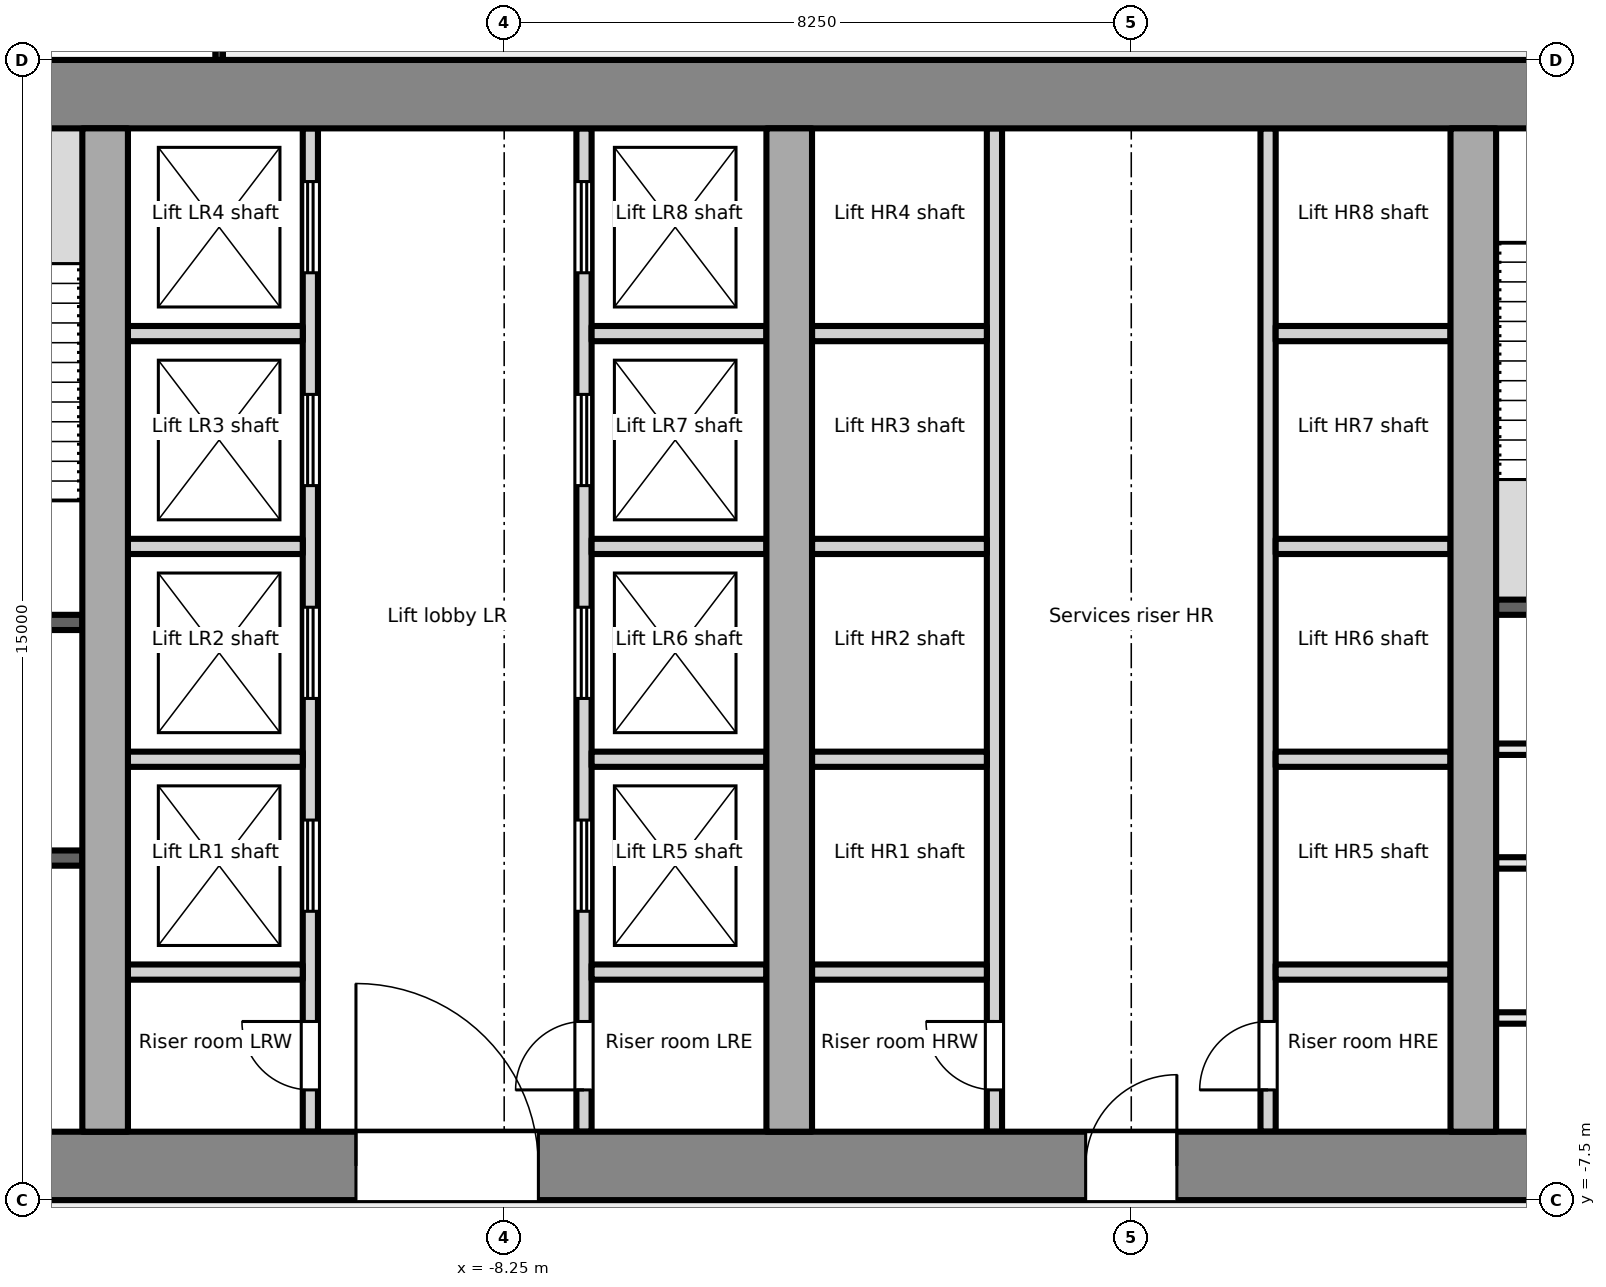
"""IFC4 building model, lengths in metres.
Left out: names, types, materials, properties, quantities, classifications, styles, units other than length and angle.
Written with IfcOpenShell. Run it as: python <this file> out.ifc"""

import sys

from ifc_helpers import new_model, si_unit, direction, frame, frame_2d, origin, place, context, subcontext, project, spatial, rectangle, extrude, element, fill, save


model = new_model("IFC4")
c1 = context("Model", 3, precision=1e-05, world=origin(), true_north=direction((0.0, 1.0)))
c2 = subcontext(c1, "Body", "Model", "MODEL_VIEW")
j1 = project(units=[si_unit("LENGTHUNIT", "METRE"), si_unit("PLANEANGLEUNIT", "RADIAN")], contexts=[c1])
p1 = place(None, origin())
s1 = spatial("IfcSite", under=j1, at=p1, CompositionType="ELEMENT")
p2 = place(p1, origin())
s2 = spatial("IfcBuilding", under=s1, at=p2, CompositionType="ELEMENT")
p3 = place(p2, frame((0.0, 0.0, 22.2)))
s3 = spatial("IfcBuildingStorey", under=s2, at=p3, CompositionType="ELEMENT", Elevation=22.2)
p4 = place(p3, frame((-18.0, -7.05, -0.2), z_axis=(0.0, 0.0, 1.0), x_axis=(1.0, 0.0, 0.0)))
e1 = element("IfcWall", 1, at=p4, inside=s3, PredefinedType="SHEAR", context=c2, shape_type="SweptSolid", body=[
    extrude(rectangle(XDim=36.0, YDim=0.9, at=frame_2d((18.0, 0.0))), origin(), (0.0, 0.0, 1.0), 4.8),
])
p5 = place(p4, frame((7.8, 0.0, 0.2)))
e2 = element("IfcOpeningElement", 2, at=p5, cuts=e1, PredefinedType="OPENING", context=c2, shape_type="SweptSolid", body=[
    extrude(rectangle(XDim=2.4, YDim=2.1, at=frame_2d((1.2, 1.05))), frame((0.0, 0.46, 0.0), z_axis=(0.0, -1.0, 0.0), x_axis=(1.0, 0.0, 0.0)), (0.0, 0.0, 1.0), 0.921),
])
p6 = place(p4, frame((17.4, 0.0, 0.2)))
e3 = element("IfcOpeningElement", 3, at=p6, cuts=e1, PredefinedType="OPENING", context=c2, shape_type="SweptSolid", body=[
    extrude(rectangle(XDim=1.2, YDim=2.1, at=frame_2d((0.6, 1.05))), frame((0.0, 0.46, 0.0), z_axis=(0.0, -1.0, 0.0), x_axis=(1.0, 0.0, 0.0)), (0.0, 0.0, 1.0), 0.921),
])
p7 = place(p4, frame((26.1, 0.0, 0.2)))
e4 = element("IfcOpeningElement", 4, at=p7, cuts=e1, PredefinedType="OPENING", context=c2, shape_type="SweptSolid", body=[
    extrude(rectangle(XDim=2.4, YDim=2.1, at=frame_2d((1.2, 1.05))), frame((0.0, 0.46, 0.0), z_axis=(0.0, -1.0, 0.0), x_axis=(1.0, 0.0, 0.0)), (0.0, 0.0, 1.0), 0.921),
])
p8 = place(p3, frame((-18.0, 7.05, -0.2), z_axis=(0.0, 0.0, 1.0), x_axis=(1.0, 0.0, 0.0)))
e5 = element("IfcWall", 5, at=p8, inside=s3, PredefinedType="SHEAR", context=c2, shape_type="SweptSolid", body=[
    extrude(rectangle(XDim=36.0, YDim=0.9, at=frame_2d((18.0, 0.0))), origin(), (0.0, 0.0, 1.0), 4.8),
])
for number, where, z_axis, x_axis in (
    (6, (-13.5, -6.6, -0.2), (0.0, 0.0, 1.0), (0.0, 1.0, 0.0)),
    (7, (-4.5, -6.6, -0.2), (0.0, 0.0, 1.0), (0.0, 1.0, 0.0)),
    (8, (4.5, -6.6, -0.2), (0.0, 0.0, 1.0), (0.0, 1.0, 0.0)),
):
    element("IfcWall", number, at=place(p3, frame(where, z_axis=z_axis, x_axis=x_axis)), inside=s3, PredefinedType="SHEAR", context=c2, shape_type="SweptSolid", body=[
        extrude(rectangle(XDim=13.2, YDim=0.6, at=frame_2d((6.6, 0.0))), origin(), (0.0, 0.0, 1.0), 4.8),
    ])
p9 = place(p3, frame((-17.1, -3.0, 0.0), z_axis=(0.0, 0.0, 1.0), x_axis=(1.0, 0.0, 0.0)))
e9 = element("IfcWall", 9, at=p9, inside=s3, PredefinedType="PARTITIONING", context=c2, shape_type="SweptSolid", body=[
    extrude(rectangle(XDim=3.3, YDim=0.2, at=frame_2d((1.65, 0.0))), origin(), (0.0, 0.0, 1.0), 4.6),
])
p10 = place(p9, frame((1.1, 0.0, 0.0)))
e10 = element("IfcOpeningElement", 10, at=p10, cuts=e9, PredefinedType="OPENING", context=c2, shape_type="SweptSolid", body=[
    extrude(rectangle(XDim=1.1, YDim=2.1, at=frame_2d((0.55, 1.05))), frame((0.0, 0.111, 0.0), z_axis=(0.0, -1.0, 0.0), x_axis=(1.0, 0.0, 0.0)), (0.0, 0.0, 1.0), 0.221),
])
p11 = place(p3, frame((-17.1, 0.1, 0.0), z_axis=(0.0, 0.0, 1.0), x_axis=(1.0, 0.0, 0.0)))
e11 = element("IfcWall", 11, at=p11, inside=s3, PredefinedType="PARTITIONING", context=c2, shape_type="SweptSolid", body=[
    extrude(rectangle(XDim=3.3, YDim=0.2, at=frame_2d((1.65, 0.0))), origin(), (0.0, 0.0, 1.0), 4.6),
])
p12 = place(p11, frame((1.1, 0.0, 0.0)))
e12 = element("IfcOpeningElement", 12, at=p12, cuts=e11, PredefinedType="OPENING", context=c2, shape_type="SweptSolid", body=[
    extrude(rectangle(XDim=1.1, YDim=2.1, at=frame_2d((0.55, 1.05))), frame((0.0, 0.111, 0.0), z_axis=(0.0, -1.0, 0.0), x_axis=(1.0, 0.0, 0.0)), (0.0, 0.0, 1.0), 0.221),
])
p13 = place(p3, frame((-10.8, -6.6, 0.0), z_axis=(0.0, 0.0, 1.0), x_axis=(0.0, 1.0, 0.0)))
e13 = element("IfcWall", 13, at=p13, inside=s3, PredefinedType="PARTITIONING", context=c2, shape_type="SweptSolid", body=[
    extrude(rectangle(XDim=13.2, YDim=0.2, at=frame_2d((6.6, 0.0))), origin(), (0.0, 0.0, 1.0), 4.6),
])
p14 = place(p13, frame((0.55, 0.0, 0.0)))
e14 = element("IfcOpeningElement", 14, at=p14, cuts=e13, PredefinedType="OPENING", context=c2, shape_type="SweptSolid", body=[
    extrude(rectangle(XDim=0.9, YDim=2.1, at=frame_2d((0.45, 1.05))), frame((0.0, 0.111, 0.0), z_axis=(0.0, -1.0, 0.0), x_axis=(1.0, 0.0, 0.0)), (0.0, 0.0, 1.0), 0.221),
])
p15 = place(p13, frame((2.9, 0.0, 0.0)))
e15 = element("IfcOpeningElement", 15, at=p15, cuts=e13, PredefinedType="OPENING", context=c2, shape_type="SweptSolid", body=[
    extrude(rectangle(XDim=1.2, YDim=2.1, at=frame_2d((0.6, 1.05))), frame((0.0, 0.111, 0.0), z_axis=(0.0, -1.0, 0.0), x_axis=(1.0, 0.0, 0.0)), (0.0, 0.0, 1.0), 0.221),
])
p16 = place(p13, frame((5.7, 0.0, 0.0)))
e16 = element("IfcOpeningElement", 16, at=p16, cuts=e13, PredefinedType="OPENING", context=c2, shape_type="SweptSolid", body=[
    extrude(rectangle(XDim=1.2, YDim=2.1, at=frame_2d((0.6, 1.05))), frame((0.0, 0.111, 0.0), z_axis=(0.0, -1.0, 0.0), x_axis=(1.0, 0.0, 0.0)), (0.0, 0.0, 1.0), 0.221),
])
p17 = place(p13, frame((8.5, 0.0, 0.0)))
e17 = element("IfcOpeningElement", 17, at=p17, cuts=e13, PredefinedType="OPENING", context=c2, shape_type="SweptSolid", body=[
    extrude(rectangle(XDim=1.2, YDim=2.1, at=frame_2d((0.6, 1.05))), frame((0.0, 0.111, 0.0), z_axis=(0.0, -1.0, 0.0), x_axis=(1.0, 0.0, 0.0)), (0.0, 0.0, 1.0), 0.221),
])
p18 = place(p13, frame((11.3, 0.0, 0.0)))
e18 = element("IfcOpeningElement", 18, at=p18, cuts=e13, PredefinedType="OPENING", context=c2, shape_type="SweptSolid", body=[
    extrude(rectangle(XDim=1.2, YDim=2.1, at=frame_2d((0.6, 1.05))), frame((0.0, 0.111, 0.0), z_axis=(0.0, -1.0, 0.0), x_axis=(1.0, 0.0, 0.0)), (0.0, 0.0, 1.0), 0.221),
])
p19 = place(p3, frame((-7.2, -6.6, 0.0), z_axis=(0.0, 0.0, 1.0), x_axis=(0.0, 1.0, 0.0)))
e19 = element("IfcWall", 19, at=p19, inside=s3, PredefinedType="PARTITIONING", context=c2, shape_type="SweptSolid", body=[
    extrude(rectangle(XDim=13.2, YDim=0.2, at=frame_2d((6.6, 0.0))), origin(), (0.0, 0.0, 1.0), 4.6),
])
p20 = place(p19, frame((0.55, 0.0, 0.0)))
e20 = element("IfcOpeningElement", 20, at=p20, cuts=e19, PredefinedType="OPENING", context=c2, shape_type="SweptSolid", body=[
    extrude(rectangle(XDim=0.9, YDim=2.1, at=frame_2d((0.45, 1.05))), frame((0.0, 0.111, 0.0), z_axis=(0.0, -1.0, 0.0), x_axis=(1.0, 0.0, 0.0)), (0.0, 0.0, 1.0), 0.221),
])
p21 = place(p19, frame((2.9, 0.0, 0.0)))
e21 = element("IfcOpeningElement", 21, at=p21, cuts=e19, PredefinedType="OPENING", context=c2, shape_type="SweptSolid", body=[
    extrude(rectangle(XDim=1.2, YDim=2.1, at=frame_2d((0.6, 1.05))), frame((0.0, 0.111, 0.0), z_axis=(0.0, -1.0, 0.0), x_axis=(1.0, 0.0, 0.0)), (0.0, 0.0, 1.0), 0.221),
])
p22 = place(p19, frame((5.7, 0.0, 0.0)))
e22 = element("IfcOpeningElement", 22, at=p22, cuts=e19, PredefinedType="OPENING", context=c2, shape_type="SweptSolid", body=[
    extrude(rectangle(XDim=1.2, YDim=2.1, at=frame_2d((0.6, 1.05))), frame((0.0, 0.111, 0.0), z_axis=(0.0, -1.0, 0.0), x_axis=(1.0, 0.0, 0.0)), (0.0, 0.0, 1.0), 0.221),
])
p23 = place(p19, frame((8.5, 0.0, 0.0)))
e23 = element("IfcOpeningElement", 23, at=p23, cuts=e19, PredefinedType="OPENING", context=c2, shape_type="SweptSolid", body=[
    extrude(rectangle(XDim=1.2, YDim=2.1, at=frame_2d((0.6, 1.05))), frame((0.0, 0.111, 0.0), z_axis=(0.0, -1.0, 0.0), x_axis=(1.0, 0.0, 0.0)), (0.0, 0.0, 1.0), 0.221),
])
p24 = place(p19, frame((11.3, 0.0, 0.0)))
e24 = element("IfcOpeningElement", 24, at=p24, cuts=e19, PredefinedType="OPENING", context=c2, shape_type="SweptSolid", body=[
    extrude(rectangle(XDim=1.2, YDim=2.1, at=frame_2d((0.6, 1.05))), frame((0.0, 0.111, 0.0), z_axis=(0.0, -1.0, 0.0), x_axis=(1.0, 0.0, 0.0)), (0.0, 0.0, 1.0), 0.221),
])
for number, where, z_axis, x_axis in (
    (25, (-13.2, -1.7, 0.0), (0.0, 0.0, 1.0), (1.0, 0.0, 0.0)),
    (26, (-13.2, 1.1, 0.0), (0.0, 0.0, 1.0), (1.0, 0.0, 0.0)),
    (27, (-13.2, 3.9, 0.0), (0.0, 0.0, 1.0), (1.0, 0.0, 0.0)),
    (28, (-13.2, -4.5, 0.0), (0.0, 0.0, 1.0), (1.0, 0.0, 0.0)),
    (29, (-7.1, -1.7, 0.0), (0.0, 0.0, 1.0), (1.0, 0.0, 0.0)),
    (30, (-7.1, 1.1, 0.0), (0.0, 0.0, 1.0), (1.0, 0.0, 0.0)),
    (31, (-7.1, 3.9, 0.0), (0.0, 0.0, 1.0), (1.0, 0.0, 0.0)),
    (32, (-7.1, -4.5, 0.0), (0.0, 0.0, 1.0), (1.0, 0.0, 0.0)),
):
    element("IfcWall", number, at=place(p3, frame(where, z_axis=z_axis, x_axis=x_axis)), inside=s3, PredefinedType="PARTITIONING", context=c2, shape_type="SweptSolid", body=[
        extrude(rectangle(XDim=2.3, YDim=0.2, at=frame_2d((1.15, 0.0))), origin(), (0.0, 0.0, 1.0), 4.6),
    ])
p25 = place(p3, frame((-1.8, -6.6, 0.0), z_axis=(0.0, 0.0, 1.0), x_axis=(0.0, 1.0, 0.0)))
e33 = element("IfcWall", 33, at=p25, inside=s3, PredefinedType="PARTITIONING", context=c2, shape_type="SweptSolid", body=[
    extrude(rectangle(XDim=13.2, YDim=0.2, at=frame_2d((6.6, 0.0))), origin(), (0.0, 0.0, 1.0), 4.6),
])
p26 = place(p25, frame((0.55, 0.0, 0.0)))
e34 = element("IfcOpeningElement", 34, at=p26, cuts=e33, PredefinedType="OPENING", context=c2, shape_type="SweptSolid", body=[
    extrude(rectangle(XDim=0.9, YDim=2.1, at=frame_2d((0.45, 1.05))), frame((0.0, 0.111, 0.0), z_axis=(0.0, -1.0, 0.0), x_axis=(1.0, 0.0, 0.0)), (0.0, 0.0, 1.0), 0.221),
])
p27 = place(p3, frame((1.8, -6.6, 0.0), z_axis=(0.0, 0.0, 1.0), x_axis=(0.0, 1.0, 0.0)))
e35 = element("IfcWall", 35, at=p27, inside=s3, PredefinedType="PARTITIONING", context=c2, shape_type="SweptSolid", body=[
    extrude(rectangle(XDim=13.2, YDim=0.2, at=frame_2d((6.6, 0.0))), origin(), (0.0, 0.0, 1.0), 4.6),
])
p28 = place(p27, frame((0.55, 0.0, 0.0)))
e36 = element("IfcOpeningElement", 36, at=p28, cuts=e35, PredefinedType="OPENING", context=c2, shape_type="SweptSolid", body=[
    extrude(rectangle(XDim=0.9, YDim=2.1, at=frame_2d((0.45, 1.05))), frame((0.0, 0.111, 0.0), z_axis=(0.0, -1.0, 0.0), x_axis=(1.0, 0.0, 0.0)), (0.0, 0.0, 1.0), 0.221),
])
for number, where, z_axis, x_axis in (
    (37, (-4.2, -1.7, 0.0), (0.0, 0.0, 1.0), (1.0, 0.0, 0.0)),
    (38, (-4.2, 1.1, 0.0), (0.0, 0.0, 1.0), (1.0, 0.0, 0.0)),
    (39, (-4.2, 3.9, 0.0), (0.0, 0.0, 1.0), (1.0, 0.0, 0.0)),
    (40, (-4.2, -4.5, 0.0), (0.0, 0.0, 1.0), (1.0, 0.0, 0.0)),
    (41, (1.9, -1.7, 0.0), (0.0, 0.0, 1.0), (1.0, 0.0, 0.0)),
    (42, (1.9, 1.1, 0.0), (0.0, 0.0, 1.0), (1.0, 0.0, 0.0)),
    (43, (1.9, 3.9, 0.0), (0.0, 0.0, 1.0), (1.0, 0.0, 0.0)),
    (44, (1.9, -4.5, 0.0), (0.0, 0.0, 1.0), (1.0, 0.0, 0.0)),
):
    element("IfcWall", number, at=place(p3, frame(where, z_axis=z_axis, x_axis=x_axis)), inside=s3, PredefinedType="PARTITIONING", context=c2, shape_type="SweptSolid", body=[
        extrude(rectangle(XDim=2.3, YDim=0.2, at=frame_2d((1.15, 0.0))), origin(), (0.0, 0.0, 1.0), 4.6),
    ])
p29 = place(p3, frame((4.8, 0.3, 0.0), z_axis=(0.0, 0.0, 1.0), x_axis=(1.0, 0.0, 0.0)))
e45 = element("IfcWall", 45, at=p29, inside=s3, PredefinedType="PARTITIONING", context=c2, shape_type="SweptSolid", body=[
    extrude(rectangle(XDim=3.15, YDim=0.2, at=frame_2d((1.575, 0.0))), origin(), (0.0, 0.0, 1.0), 4.6),
])
for number, where, z_axis, x_axis in (
    (46, (4.8, -5.104, 0.0), (0.0, 0.0, 1.0), (1.0, 0.0, 0.0)),
    (47, (4.8, -3.064, 0.0), (0.0, 0.0, 1.0), (1.0, 0.0, 0.0)),
    (48, (4.8, -1.568, 0.0), (0.0, 0.0, 1.0), (1.0, 0.0, 0.0)),
):
    element("IfcWall", number, at=place(p3, frame(where, z_axis=z_axis, x_axis=x_axis)), inside=s3, PredefinedType="PARTITIONING", context=c2, shape_type="SweptSolid", body=[
        extrude(rectangle(XDim=3.15, YDim=0.15, at=frame_2d((1.575, 0.0))), origin(), (0.0, 0.0, 1.0), 4.6),
    ])
p30 = place(p3, frame((-12.0, 7.5, 0.0), z_axis=(0.0, 0.0, 1.0), x_axis=(0.0, 1.0, 0.0)))
e49 = element("IfcWall", 49, at=p30, inside=s3, PredefinedType="PARTITIONING", context=c2, shape_type="SweptSolid", body=[
    extrude(rectangle(XDim=3.0, YDim=0.1, at=frame_2d((1.5, 0.0))), origin(), (0.0, 0.0, 1.0), 3.5),
])
p31 = place(p14, origin())
e50 = element("IfcDoor", 50, at=p31, inside=s3, OperationType="SINGLE_SWING_RIGHT", PredefinedType="DOOR", context=c2, shape_type="SweptSolid", body=[
    extrude(rectangle(XDim=0.9, YDim=2.1, at=frame_2d((0.45, 1.05))), frame((0.0, 0.025, 0.0), z_axis=(0.0, -1.0, 0.0), x_axis=(1.0, 0.0, 0.0)), (0.0, 0.0, 1.0), 0.05),
])
fill(e14, e50)
p32 = place(p15, origin())
e51 = element("IfcDoor", 51, at=p32, inside=s3, OperationType="DOUBLE_DOOR_SLIDING", PredefinedType="DOOR", context=c2, shape_type="SweptSolid", body=[
    extrude(rectangle(XDim=1.2, YDim=2.1, at=frame_2d((0.6, 1.05))), frame((0.0, 0.025, 0.0), z_axis=(0.0, -1.0, 0.0), x_axis=(1.0, 0.0, 0.0)), (0.0, 0.0, 1.0), 0.05),
])
fill(e15, e51)
p33 = place(p16, origin())
e52 = element("IfcDoor", 52, at=p33, inside=s3, OperationType="DOUBLE_DOOR_SLIDING", PredefinedType="DOOR", context=c2, shape_type="SweptSolid", body=[
    extrude(rectangle(XDim=1.2, YDim=2.1, at=frame_2d((0.6, 1.05))), frame((0.0, 0.025, 0.0), z_axis=(0.0, -1.0, 0.0), x_axis=(1.0, 0.0, 0.0)), (0.0, 0.0, 1.0), 0.05),
])
fill(e16, e52)
p34 = place(p17, origin())
e53 = element("IfcDoor", 53, at=p34, inside=s3, OperationType="DOUBLE_DOOR_SLIDING", PredefinedType="DOOR", context=c2, shape_type="SweptSolid", body=[
    extrude(rectangle(XDim=1.2, YDim=2.1, at=frame_2d((0.6, 1.05))), frame((0.0, 0.025, 0.0), z_axis=(0.0, -1.0, 0.0), x_axis=(1.0, 0.0, 0.0)), (0.0, 0.0, 1.0), 0.05),
])
fill(e17, e53)
p35 = place(p18, origin())
e54 = element("IfcDoor", 54, at=p35, inside=s3, OperationType="DOUBLE_DOOR_SLIDING", PredefinedType="DOOR", context=c2, shape_type="SweptSolid", body=[
    extrude(rectangle(XDim=1.2, YDim=2.1, at=frame_2d((0.6, 1.05))), frame((0.0, 0.025, 0.0), z_axis=(0.0, -1.0, 0.0), x_axis=(1.0, 0.0, 0.0)), (0.0, 0.0, 1.0), 0.05),
])
fill(e18, e54)
p36 = place(p20, origin())
e55 = element("IfcDoor", 55, at=p36, inside=s3, OperationType="SINGLE_SWING_LEFT", PredefinedType="DOOR", context=c2, shape_type="SweptSolid", body=[
    extrude(rectangle(XDim=0.9, YDim=2.1, at=frame_2d((0.45, 1.05))), frame((0.0, 0.025, 0.0), z_axis=(0.0, -1.0, 0.0), x_axis=(1.0, 0.0, 0.0)), (0.0, 0.0, 1.0), 0.05),
])
fill(e20, e55)
p37 = place(p21, origin())
e56 = element("IfcDoor", 56, at=p37, inside=s3, OperationType="DOUBLE_DOOR_SLIDING", PredefinedType="DOOR", context=c2, shape_type="SweptSolid", body=[
    extrude(rectangle(XDim=1.2, YDim=2.1, at=frame_2d((0.6, 1.05))), frame((0.0, 0.025, 0.0), z_axis=(0.0, -1.0, 0.0), x_axis=(1.0, 0.0, 0.0)), (0.0, 0.0, 1.0), 0.05),
])
fill(e21, e56)
p38 = place(p22, origin())
e57 = element("IfcDoor", 57, at=p38, inside=s3, OperationType="DOUBLE_DOOR_SLIDING", PredefinedType="DOOR", context=c2, shape_type="SweptSolid", body=[
    extrude(rectangle(XDim=1.2, YDim=2.1, at=frame_2d((0.6, 1.05))), frame((0.0, 0.025, 0.0), z_axis=(0.0, -1.0, 0.0), x_axis=(1.0, 0.0, 0.0)), (0.0, 0.0, 1.0), 0.05),
])
fill(e22, e57)
p39 = place(p23, origin())
e58 = element("IfcDoor", 58, at=p39, inside=s3, OperationType="DOUBLE_DOOR_SLIDING", PredefinedType="DOOR", context=c2, shape_type="SweptSolid", body=[
    extrude(rectangle(XDim=1.2, YDim=2.1, at=frame_2d((0.6, 1.05))), frame((0.0, 0.025, 0.0), z_axis=(0.0, -1.0, 0.0), x_axis=(1.0, 0.0, 0.0)), (0.0, 0.0, 1.0), 0.05),
])
fill(e23, e58)
p40 = place(p24, origin())
e59 = element("IfcDoor", 59, at=p40, inside=s3, OperationType="DOUBLE_DOOR_SLIDING", PredefinedType="DOOR", context=c2, shape_type="SweptSolid", body=[
    extrude(rectangle(XDim=1.2, YDim=2.1, at=frame_2d((0.6, 1.05))), frame((0.0, 0.025, 0.0), z_axis=(0.0, -1.0, 0.0), x_axis=(1.0, 0.0, 0.0)), (0.0, 0.0, 1.0), 0.05),
])
fill(e24, e59)
p41 = place(p5, origin())
e60 = element("IfcDoor", 60, at=p41, inside=s3, OperationType="DOUBLE_DOOR_DOUBLE_SWING", PredefinedType="DOOR", context=c2, shape_type="SweptSolid", body=[
    extrude(rectangle(XDim=2.4, YDim=2.1, at=frame_2d((1.2, 1.05))), frame((0.0, 0.025, 0.0), z_axis=(0.0, -1.0, 0.0), x_axis=(1.0, 0.0, 0.0)), (0.0, 0.0, 1.0), 0.05),
])
fill(e2, e60)
p42 = place(p26, origin())
e61 = element("IfcDoor", 61, at=p42, inside=s3, OperationType="SINGLE_SWING_RIGHT", PredefinedType="DOOR", context=c2, shape_type="SweptSolid", body=[
    extrude(rectangle(XDim=0.9, YDim=2.1, at=frame_2d((0.45, 1.05))), frame((0.0, 0.025, 0.0), z_axis=(0.0, -1.0, 0.0), x_axis=(1.0, 0.0, 0.0)), (0.0, 0.0, 1.0), 0.05),
])
fill(e34, e61)
p43 = place(p28, origin())
e62 = element("IfcDoor", 62, at=p43, inside=s3, OperationType="SINGLE_SWING_LEFT", PredefinedType="DOOR", context=c2, shape_type="SweptSolid", body=[
    extrude(rectangle(XDim=0.9, YDim=2.1, at=frame_2d((0.45, 1.05))), frame((0.0, 0.025, 0.0), z_axis=(0.0, -1.0, 0.0), x_axis=(1.0, 0.0, 0.0)), (0.0, 0.0, 1.0), 0.05),
])
fill(e36, e62)
p44 = place(p6, origin())
e63 = element("IfcDoor", 63, at=p44, inside=s3, OperationType="SINGLE_SWING_RIGHT", PredefinedType="DOOR", context=c2, shape_type="SweptSolid", body=[
    extrude(rectangle(XDim=1.2, YDim=2.1, at=frame_2d((0.6, 1.05))), frame((0.0, 0.025, 0.0), z_axis=(0.0, -1.0, 0.0), x_axis=(1.0, 0.0, 0.0)), (0.0, 0.0, 1.0), 0.05),
])
fill(e3, e63)
save(model, sys.argv[1])
